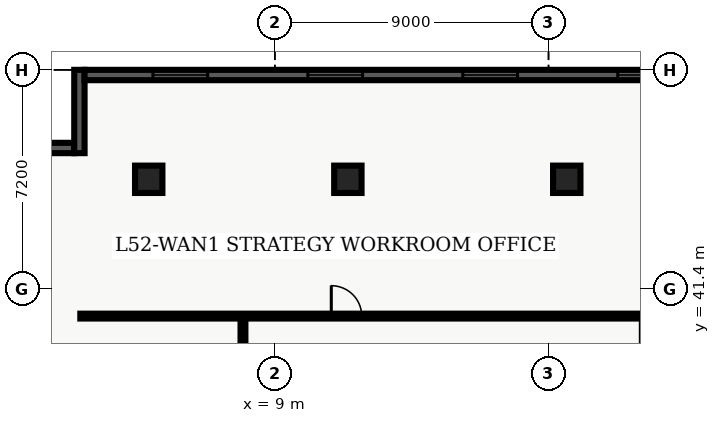
"""IFC4 building model, lengths in metres.
Left out: names, types, materials, properties, quantities, classifications, styles, units other than length and angle.
Written with IfcOpenShell. Run it as: python <this file> out.ifc"""

import sys

from ifc_helpers import new_model, entity, si_unit, converted_unit, direction, frame, origin_with_axes, origin_2d_with_axis, place, context, subcontext, project, spatial, polyline, rectangle, outline, extrude, element, fill, save


model = new_model("IFC4")
c1 = context("Model", 3, precision=1e-05, world=origin_with_axes(), true_north=direction((0.0, 1.0)))
c2 = subcontext(c1, "Body", "Model", "MODEL_VIEW")
j1 = project(units=[si_unit("LENGTHUNIT", "METRE"), converted_unit("PLANEANGLEUNIT", "DEGREE", entity("IfcPlaneAngleMeasure", 0.017), si_unit("PLANEANGLEUNIT", "RADIAN"), dimensions=[0, 0, 0, 0, 0, 0, 0])], contexts=[c1])
p1 = place(None, origin_with_axes())
s1 = spatial("IfcSite", under=j1, at=p1, CompositionType="ELEMENT")
p2 = place(p1, origin_with_axes())
s2 = spatial("IfcBuilding", under=s1, at=p2, CompositionType="ELEMENT")
p3 = place(p2, frame((0.0, 0.0, 212.1), z_axis=(0.0, 0.0, 1.0), x_axis=(1.0, 0.0, 0.0)))
s3 = spatial("IfcBuildingStorey", under=s2, at=p3, CompositionType="ELEMENT", Elevation=212.1)
for number, where, z_axis, x_axis in (
    (1, (11.4, 45.0, 0.0), (0.0, 0.0, 1.0), (1.0, 0.0, 0.0)),
    (2, (18.6, 45.0, 0.0), (0.0, 0.0, 1.0), (1.0, 0.0, 0.0)),
    (3, (4.85, 45.0, 0.0), (0.0, 0.0, 1.0), (1.0, 0.0, 0.0)),
):
    element("IfcColumn", number, at=place(p3, frame(where, z_axis=z_axis, x_axis=x_axis)), inside=s3, PredefinedType="COLUMN", context=c2, shape_type="SweptSolid", body=[
        extrude(rectangle(XDim=0.9, YDim=0.9, at=origin_2d_with_axis()), origin_with_axes(), (0.0, 0.0, 1.0), 3.9),
    ])
p4 = place(p3, frame((2.6, 40.5, 0.0), z_axis=(0.0, 0.0, 1.0), x_axis=(1.0, 0.0, 0.0)))
e4 = element("IfcWall", 4, at=p4, inside=s3, PredefinedType="PARTITIONING", context=c2, shape_type="SweptSolid", body=[
    extrude(outline(polyline([(0.0, -0.08), (28.59, -0.08), (28.59, 0.08), (0.0, 0.08), (0.0, -0.08)])), origin_with_axes(), (0.0, 0.0, 1.0), 2.7),
])
p5 = place(p4, frame((8.755, 0.0, 0.0), z_axis=(0.0, 0.0, 1.0), x_axis=(1.0, 0.0, 0.0)))
e5 = element("IfcOpeningElement", 5, at=p5, cuts=e4, PredefinedType="OPENING", context=c2, shape_type="SweptSolid", body=[
    extrude(rectangle(XDim=1.0, YDim=0.18, at=origin_2d_with_axis()), origin_with_axes(), (0.0, 0.0, 1.0), 2.15),
])
p6 = place(p3, frame((7.95, 7.8, 0.0), z_axis=(0.0, 0.0, 1.0), x_axis=(0.0, 1.0, 0.0)))
e6 = element("IfcWall", 6, at=p6, inside=s3, PredefinedType="PARTITIONING", context=c2, shape_type="SweptSolid", body=[
    extrude(outline(polyline([(0.0, -0.08), (32.7, -0.08), (32.7, 0.08), (0.0, 0.08), (0.0, -0.08)])), origin_with_axes(), (0.0, 0.0, 1.0), 2.7),
])
p7 = place(p6, frame((1.915, 0.0, 0.0), z_axis=(0.0, 0.0, 1.0), x_axis=(1.0, 0.0, 0.0)))
e7 = element("IfcOpeningElement", 7, at=p7, cuts=e6, PredefinedType="OPENING", context=c2, shape_type="SweptSolid", body=[
    extrude(rectangle(XDim=1.0, YDim=0.18, at=origin_2d_with_axis()), origin_with_axes(), (0.0, 0.0, 1.0), 2.15),
])
p8 = place(p6, frame((5.705, 0.0, 0.0), z_axis=(0.0, 0.0, 1.0), x_axis=(1.0, 0.0, 0.0)))
e8 = element("IfcOpeningElement", 8, at=p8, cuts=e6, PredefinedType="OPENING", context=c2, shape_type="SweptSolid", body=[
    extrude(rectangle(XDim=1.0, YDim=0.18, at=origin_2d_with_axis()), origin_with_axes(), (0.0, 0.0, 1.0), 2.15),
])
p9 = place(p6, frame((10.066, 0.0, 0.0), z_axis=(0.0, 0.0, 1.0), x_axis=(1.0, 0.0, 0.0)))
e9 = element("IfcOpeningElement", 9, at=p9, cuts=e6, PredefinedType="OPENING", context=c2, shape_type="SweptSolid", body=[
    extrude(rectangle(XDim=1.0, YDim=0.18, at=origin_2d_with_axis()), origin_with_axes(), (0.0, 0.0, 1.0), 2.15),
])
p10 = place(p6, frame((15.195, 0.0, 0.0), z_axis=(0.0, 0.0, 1.0), x_axis=(1.0, 0.0, 0.0)))
e10 = element("IfcOpeningElement", 10, at=p10, cuts=e6, PredefinedType="OPENING", context=c2, shape_type="SweptSolid", body=[
    extrude(rectangle(XDim=1.0, YDim=0.18, at=origin_2d_with_axis()), origin_with_axes(), (0.0, 0.0, 1.0), 2.15),
])
p11 = place(p6, frame((21.311, 0.0, 0.0), z_axis=(0.0, 0.0, 1.0), x_axis=(1.0, 0.0, 0.0)))
e11 = element("IfcOpeningElement", 11, at=p11, cuts=e6, PredefinedType="OPENING", context=c2, shape_type="SweptSolid", body=[
    extrude(rectangle(XDim=1.0, YDim=0.18, at=origin_2d_with_axis()), origin_with_axes(), (0.0, 0.0, 1.0), 2.15),
])
p12 = place(p6, frame((28.611, 0.0, 0.0), z_axis=(0.0, 0.0, 1.0), x_axis=(1.0, 0.0, 0.0)))
e12 = element("IfcOpeningElement", 12, at=p12, cuts=e6, PredefinedType="OPENING", context=c2, shape_type="SweptSolid", body=[
    extrude(rectangle(XDim=1.0, YDim=0.18, at=origin_2d_with_axis()), origin_with_axes(), (0.0, 0.0, 1.0), 2.15),
])
p13 = place(p3, frame((0.34, 46.03, 0.0), z_axis=(0.0, 0.0, 1.0), x_axis=(1.0, 0.0, 0.0)))
e13 = element("IfcWall", 13, at=p13, inside=s3, PredefinedType="SOLIDWALL", context=c2, shape_type="SweptSolid", body=[
    extrude(outline(polyline([(0.0, -0.17), (2.06, -0.17), (2.06, 0.17), (0.0, 0.17), (0.0, -0.17)])), origin_with_axes(), (0.0, 0.0, 1.0), 3.66),
])
p14 = place(p3, frame((2.57, 45.86, 0.0), z_axis=(0.0, 0.0, 1.0), x_axis=(0.0, 1.0, 0.0)))
e14 = element("IfcWall", 14, at=p14, inside=s3, PredefinedType="SOLIDWALL", context=c2, shape_type="SweptSolid", body=[
    extrude(outline(polyline([(0.0, -0.17), (2.74, -0.17), (2.74, 0.17), (0.0, 0.17), (0.0, -0.17)])), origin_with_axes(), (0.0, 0.0, 1.0), 3.66),
])
p15 = place(p3, frame((2.74, 48.43, 0.0), z_axis=(0.0, 0.0, 1.0), x_axis=(1.0, 0.0, 0.0)))
e15 = element("IfcWall", 15, at=p15, inside=s3, PredefinedType="SOLIDWALL", context=c2, shape_type="SweptSolid", body=[
    extrude(outline(polyline([(0.0, -0.17), (21.585, -0.17), (21.585, 0.17), (0.0, 0.17), (0.0, -0.17)])), origin_with_axes(), (0.0, 0.0, 1.0), 3.66),
])
p16 = place(p15, frame((3.148, 0.0, 0.45), z_axis=(0.0, 0.0, 1.0), x_axis=(1.0, 0.0, 0.0)))
e16 = element("IfcOpeningElement", 16, at=p16, cuts=e15, PredefinedType="OPENING", context=c2, shape_type="SweptSolid", body=[
    extrude(rectangle(XDim=1.8, YDim=0.36, at=origin_2d_with_axis()), origin_with_axes(), (0.0, 0.0, 1.0), 2.1),
])
p17 = place(p15, frame((8.244, 0.0, 0.45), z_axis=(0.0, 0.0, 1.0), x_axis=(1.0, 0.0, 0.0)))
e17 = element("IfcOpeningElement", 17, at=p17, cuts=e15, PredefinedType="OPENING", context=c2, shape_type="SweptSolid", body=[
    extrude(rectangle(XDim=1.8, YDim=0.36, at=origin_2d_with_axis()), origin_with_axes(), (0.0, 0.0, 1.0), 2.1),
])
p18 = place(p15, frame((13.341, 0.0, 0.45), z_axis=(0.0, 0.0, 1.0), x_axis=(1.0, 0.0, 0.0)))
e18 = element("IfcOpeningElement", 18, at=p18, cuts=e15, PredefinedType="OPENING", context=c2, shape_type="SweptSolid", body=[
    extrude(rectangle(XDim=1.8, YDim=0.36, at=origin_2d_with_axis()), origin_with_axes(), (0.0, 0.0, 1.0), 2.1),
])
p19 = place(p15, frame((18.437, 0.0, 0.45), z_axis=(0.0, 0.0, 1.0), x_axis=(1.0, 0.0, 0.0)))
e19 = element("IfcOpeningElement", 19, at=p19, cuts=e15, PredefinedType="OPENING", context=c2, shape_type="SweptSolid", body=[
    extrude(rectangle(XDim=1.8, YDim=0.36, at=origin_2d_with_axis()), origin_with_axes(), (0.0, 0.0, 1.0), 2.1),
])
p20 = place(p4, frame((8.755, 0.0, 0.0), z_axis=(0.0, 0.0, 1.0), x_axis=(1.0, 0.0, 0.0)))
e20 = element("IfcDoor", 20, at=p20, inside=s3, OperationType="SINGLE_SWING_LEFT", PredefinedType="DOOR", context=c2, shape_type="SweptSolid", body=[
    extrude(rectangle(XDim=1.0, YDim=0.09, at=origin_2d_with_axis()), origin_with_axes(), (0.0, 0.0, 1.0), 2.15),
])
fill(e5, e20)
p21 = place(p15, frame((3.148, 0.0, 0.45), z_axis=(0.0, 0.0, 1.0), x_axis=(1.0, 0.0, 0.0)))
e21 = element("IfcWindow", 21, at=p21, inside=s3, PredefinedType="WINDOW", context=c2, shape_type="SweptSolid", body=[
    extrude(rectangle(XDim=1.8, YDim=0.09, at=origin_2d_with_axis()), origin_with_axes(), (0.0, 0.0, 1.0), 2.1),
])
fill(e16, e21)
p22 = place(p15, frame((8.244, 0.0, 0.45), z_axis=(0.0, 0.0, 1.0), x_axis=(1.0, 0.0, 0.0)))
e22 = element("IfcWindow", 22, at=p22, inside=s3, PredefinedType="WINDOW", context=c2, shape_type="SweptSolid", body=[
    extrude(rectangle(XDim=1.8, YDim=0.09, at=origin_2d_with_axis()), origin_with_axes(), (0.0, 0.0, 1.0), 2.1),
])
fill(e17, e22)
p23 = place(p15, frame((13.341, 0.0, 0.45), z_axis=(0.0, 0.0, 1.0), x_axis=(1.0, 0.0, 0.0)))
e23 = element("IfcWindow", 23, at=p23, inside=s3, PredefinedType="WINDOW", context=c2, shape_type="SweptSolid", body=[
    extrude(rectangle(XDim=1.8, YDim=0.09, at=origin_2d_with_axis()), origin_with_axes(), (0.0, 0.0, 1.0), 2.1),
])
fill(e18, e23)
p24 = place(p15, frame((18.437, 0.0, 0.45), z_axis=(0.0, 0.0, 1.0), x_axis=(1.0, 0.0, 0.0)))
e24 = element("IfcWindow", 24, at=p24, inside=s3, PredefinedType="WINDOW", context=c2, shape_type="SweptSolid", body=[
    extrude(rectangle(XDim=1.8, YDim=0.09, at=origin_2d_with_axis()), origin_with_axes(), (0.0, 0.0, 1.0), 2.1),
])
fill(e19, e24)
save(model, sys.argv[1])
